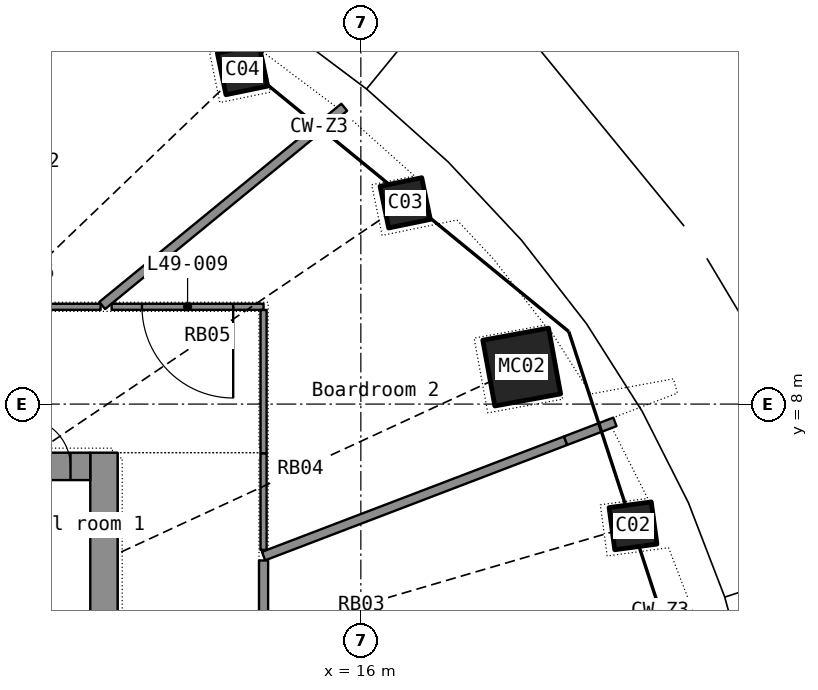
"""IFC4 building model, lengths in metres.
Left out: names, types, materials, properties, quantities, classifications, styles, units other than length and angle.
Written with IfcOpenShell. Run it as: python <this file> out.ifc"""

import sys

from ifc_helpers import new_model, si_unit, direction, frame, frame_2d, origin, origin_2d, place, context, subcontext, project, spatial, rectangle, hollow_rectangle, extrude, element, fill, save


model = new_model("IFC4")
c1 = context("Model", 3, precision=1e-05, world=origin(), true_north=direction((0.0, 1.0)))
c2 = subcontext(c1, "Body", "Model", "MODEL_VIEW")
j1 = project(units=[si_unit("LENGTHUNIT", "METRE"), si_unit("PLANEANGLEUNIT", "RADIAN")], contexts=[c1])
p1 = place(None, origin())
s1 = spatial("IfcSite", under=j1, at=p1, CompositionType="ELEMENT")
p2 = place(p1, origin())
s2 = spatial("IfcBuilding", under=s1, at=p2, CompositionType="ELEMENT")
p3 = place(p2, frame((0.0, 0.0, 201.5)))
s3 = spatial("IfcBuildingStorey", under=s2, at=p3, CompositionType="ELEMENT", Elevation=201.5)
p4 = place(p3, frame((20.476, 5.998, 0.0), z_axis=(-0.032511791, -0.009694185, 0.999424337), x_axis=(0.410410626, -0.911889695, 0.004505751)))
e1 = element("IfcColumn", 1, at=p4, inside=s3, PredefinedType="COLUMN", context=c2, shape_type="SweptSolid", body=[
    extrude(hollow_rectangle(XDim=0.7, YDim=0.7, WallThickness=0.025, at=origin_2d()), origin(), (0.0, 0.0, 1.0), 3.702),
])
p5 = place(p3, frame((18.646, 8.609, 0.0), z_axis=(-0.029940695, -0.014113015, 0.999452039), x_axis=(0.582481605, -0.812821947, 0.005971808)))
e2 = element("IfcColumn", 2, at=p5, inside=s3, PredefinedType="COLUMN", context=c2, shape_type="SweptSolid", body=[
    extrude(hollow_rectangle(XDim=1.1, YDim=1.1, WallThickness=0.032, at=origin_2d()), origin(), (0.0, 0.0, 1.0), 3.702),
])
p6 = place(p3, frame((16.729, 11.31, 0.0), z_axis=(-0.026512179, -0.018202391, 0.999482755), x_axis=(0.720491942, -0.693433005, 0.006483025)))
e3 = element("IfcColumn", 3, at=p6, inside=s3, PredefinedType="COLUMN", context=c2, shape_type="SweptSolid", body=[
    extrude(hollow_rectangle(XDim=0.7, YDim=0.7, WallThickness=0.025, at=origin_2d()), origin(), (0.0, 0.0, 1.0), 3.702),
])
p7 = place(p3, frame((14.053, 13.502, 0.0), z_axis=(-0.022226156, -0.021698532, 0.999517469), x_axis=(0.828555744, -0.559871471, 0.006270246)))
e4 = element("IfcColumn", 4, at=p7, inside=s3, PredefinedType="COLUMN", context=c2, shape_type="SweptSolid", body=[
    extrude(hollow_rectangle(XDim=0.7, YDim=0.7, WallThickness=0.025, at=origin_2d()), origin(), (0.0, 0.0, 1.0), 3.702),
])
p8 = place(p3, frame((11.775, -7.2, 0.0), z_axis=(0.0, 0.0, 1.0), x_axis=(0.0, 1.0, 0.0)))
e5 = element("IfcWall", 5, at=p8, inside=s3, PredefinedType="SHEAR", context=c2, shape_type="SweptSolid", body=[
    extrude(rectangle(XDim=14.4, YDim=0.45, at=frame_2d((7.2, 0.0))), origin(), (0.0, 0.0, 1.0), 3.3),
])
p9 = place(p8, frame((6.5, 0.0, 0.0)))
e6 = element("IfcOpeningElement", 6, at=p9, cuts=e5, PredefinedType="OPENING", context=c2, shape_type="SweptSolid", body=[
    extrude(rectangle(XDim=1.4, YDim=2.2, at=frame_2d((0.7, 1.1))), frame((0.0, 0.235, 0.0), z_axis=(0.0, -1.0, 0.0), x_axis=(1.0, 0.0, 0.0)), (0.0, 0.0, 1.0), 0.47),
])
p10 = place(p3, frame((-11.55, 6.975, 0.0), z_axis=(0.0, 0.0, 1.0), x_axis=(1.0, 0.0, 0.0)))
e7 = element("IfcWall", 7, at=p10, inside=s3, PredefinedType="SHEAR", context=c2, shape_type="SweptSolid", body=[
    extrude(rectangle(XDim=23.1, YDim=0.45, at=frame_2d((11.55, 0.0))), origin(), (0.0, 0.0, 1.0), 3.3),
])
p11 = place(p10, frame((2.0, 0.0, 0.0)))
e8 = element("IfcOpeningElement", 8, at=p11, cuts=e7, PredefinedType="OPENING", context=c2, shape_type="SweptSolid", body=[
    extrude(rectangle(XDim=1.1, YDim=2.2, at=frame_2d((0.55, 1.1))), frame((0.0, 0.235, 0.0), z_axis=(0.0, -1.0, 0.0), x_axis=(1.0, 0.0, 0.0)), (0.0, 0.0, 1.0), 0.47),
])
p12 = place(p10, frame((6.0, 0.0, 0.0)))
e9 = element("IfcOpeningElement", 9, at=p12, cuts=e7, PredefinedType="OPENING", context=c2, shape_type="SweptSolid", body=[
    extrude(rectangle(XDim=1.1, YDim=2.2, at=frame_2d((0.55, 1.1))), frame((0.0, 0.235, 0.0), z_axis=(0.0, -1.0, 0.0), x_axis=(1.0, 0.0, 0.0)), (0.0, 0.0, 1.0), 0.47),
])
p13 = place(p10, frame((8.0, 0.0, 0.0)))
e10 = element("IfcOpeningElement", 10, at=p13, cuts=e7, PredefinedType="OPENING", context=c2, shape_type="SweptSolid", body=[
    extrude(rectangle(XDim=1.1, YDim=2.2, at=frame_2d((0.55, 1.1))), frame((0.0, 0.235, 0.0), z_axis=(0.0, -1.0, 0.0), x_axis=(1.0, 0.0, 0.0)), (0.0, 0.0, 1.0), 0.47),
])
p14 = place(p10, frame((10.0, 0.0, 0.0)))
e11 = element("IfcOpeningElement", 11, at=p14, cuts=e7, PredefinedType="OPENING", context=c2, shape_type="SweptSolid", body=[
    extrude(rectangle(XDim=1.1, YDim=2.2, at=frame_2d((0.55, 1.1))), frame((0.0, 0.235, 0.0), z_axis=(0.0, -1.0, 0.0), x_axis=(1.0, 0.0, 0.0)), (0.0, 0.0, 1.0), 0.47),
])
p15 = place(p10, frame((12.0, 0.0, 0.0)))
e12 = element("IfcOpeningElement", 12, at=p15, cuts=e7, PredefinedType="OPENING", context=c2, shape_type="SweptSolid", body=[
    extrude(rectangle(XDim=1.1, YDim=2.2, at=frame_2d((0.55, 1.1))), frame((0.0, 0.235, 0.0), z_axis=(0.0, -1.0, 0.0), x_axis=(1.0, 0.0, 0.0)), (0.0, 0.0, 1.0), 0.47),
])
p16 = place(p10, frame((14.0, 0.0, 0.0)))
e13 = element("IfcOpeningElement", 13, at=p16, cuts=e7, PredefinedType="OPENING", context=c2, shape_type="SweptSolid", body=[
    extrude(rectangle(XDim=1.1, YDim=2.2, at=frame_2d((0.55, 1.1))), frame((0.0, 0.235, 0.0), z_axis=(0.0, -1.0, 0.0), x_axis=(1.0, 0.0, 0.0)), (0.0, 0.0, 1.0), 0.47),
])
p17 = place(p10, frame((16.0, 0.0, 0.0)))
e14 = element("IfcOpeningElement", 14, at=p17, cuts=e7, PredefinedType="OPENING", context=c2, shape_type="SweptSolid", body=[
    extrude(rectangle(XDim=1.1, YDim=2.2, at=frame_2d((0.55, 1.1))), frame((0.0, 0.235, 0.0), z_axis=(0.0, -1.0, 0.0), x_axis=(1.0, 0.0, 0.0)), (0.0, 0.0, 1.0), 0.47),
])
p18 = place(p10, frame((18.0, 0.0, 0.0)))
e15 = element("IfcOpeningElement", 15, at=p18, cuts=e7, PredefinedType="OPENING", context=c2, shape_type="SweptSolid", body=[
    extrude(rectangle(XDim=1.1, YDim=2.2, at=frame_2d((0.55, 1.1))), frame((0.0, 0.235, 0.0), z_axis=(0.0, -1.0, 0.0), x_axis=(1.0, 0.0, 0.0)), (0.0, 0.0, 1.0), 0.47),
])
p19 = place(p10, frame((20.0, 0.0, 0.0)))
e16 = element("IfcOpeningElement", 16, at=p19, cuts=e7, PredefinedType="OPENING", context=c2, shape_type="SweptSolid", body=[
    extrude(rectangle(XDim=1.1, YDim=2.2, at=frame_2d((0.55, 1.1))), frame((0.0, 0.235, 0.0), z_axis=(0.0, -1.0, 0.0), x_axis=(1.0, 0.0, 0.0)), (0.0, 0.0, 1.0), 0.47),
])
p20 = place(p10, frame((4.1, 0.0, 0.0)))
e17 = element("IfcOpeningElement", 17, at=p20, cuts=e7, PredefinedType="OPENING", context=c2, shape_type="SweptSolid", body=[
    extrude(rectangle(XDim=0.9, YDim=2.1, at=frame_2d((0.45, 1.05))), frame((0.0, 0.235, 0.0), z_axis=(0.0, -1.0, 0.0), x_axis=(1.0, 0.0, 0.0)), (0.0, 0.0, 1.0), 0.47),
])
p21 = place(p10, frame((0.325, 0.0, 0.0)))
e18 = element("IfcOpeningElement", 18, at=p21, cuts=e7, PredefinedType="OPENING", context=c2, shape_type="SweptSolid", body=[
    extrude(rectangle(XDim=0.8, YDim=2.05, at=frame_2d((0.4, 1.025))), frame((0.0, 0.235, 0.0), z_axis=(0.0, -1.0, 0.0), x_axis=(1.0, 0.0, 0.0)), (0.0, 0.0, 1.0), 0.47),
])
p22 = place(p10, frame((21.975, 0.0, 0.0)))
e19 = element("IfcOpeningElement", 19, at=p22, cuts=e7, PredefinedType="OPENING", context=c2, shape_type="SweptSolid", body=[
    extrude(rectangle(XDim=0.8, YDim=2.05, at=frame_2d((0.4, 1.025))), frame((0.0, 0.235, 0.0), z_axis=(0.0, -1.0, 0.0), x_axis=(1.0, 0.0, 0.0)), (0.0, 0.0, 1.0), 0.47),
])
p23 = place(p3, frame((11.72, 9.6, 0.0), z_axis=(0.0, 0.0, 1.0), x_axis=(-1.0, 0.0, 0.0)))
e20 = element("IfcWall", 20, at=p23, inside=s3, PredefinedType="PARTITIONING", context=c2, shape_type="SweptSolid", body=[
    extrude(rectangle(XDim=6.138, YDim=0.1, at=frame_2d((3.069, 0.0))), origin(), (0.0, 0.0, 1.0), 2.4),
])
p24 = place(p23, frame((2.319, 0.0, 0.0)))
e21 = element("IfcOpeningElement", 21, at=p24, cuts=e20, PredefinedType="OPENING", context=c2, shape_type="SweptSolid", body=[
    extrude(rectangle(XDim=1.5, YDim=2.4, at=frame_2d((0.75, 1.2))), frame((0.0, 0.06, 0.0), z_axis=(0.0, -1.0, 0.0), x_axis=(1.0, 0.0, 0.0)), (0.0, 0.0, 1.0), 0.12),
])
p25 = place(p3, frame((19.367, 7.397, 0.0), z_axis=(0.0, 0.0, 1.0), x_axis=(-0.934183326, -0.356793376, 0.0)))
e22 = element("IfcWall", 22, at=p25, inside=s3, PredefinedType="PARTITIONING", context=c2, shape_type="SweptSolid", body=[
    extrude(rectangle(XDim=5.317, YDim=0.15, at=frame_2d((2.658, 0.0))), origin(), (0.0, 0.0, 1.0), 2.4),
])
p26 = place(p3, frame((15.727, 12.882, 0.0), z_axis=(0.0, 0.0, 1.0), x_axis=(-0.773595696, -0.633679492, 0.0)))
e23 = element("IfcWall", 23, at=p26, inside=s3, PredefinedType="PARTITIONING", context=c2, shape_type="SweptSolid", body=[
    extrude(rectangle(XDim=5.146, YDim=0.15, at=frame_2d((2.573, 0.0))), origin(), (0.0, 0.0, 1.0), 2.4),
])
p27 = place(p3, frame((14.4, 1.577, 0.0), z_axis=(0.0, 0.0, 1.0), x_axis=(0.0, 1.0, 0.0)))
e24 = element("IfcWall", 24, at=p27, inside=s3, PredefinedType="PARTITIONING", context=c2, shape_type="SweptSolid", body=[
    extrude(rectangle(XDim=3.851, YDim=0.15, at=frame_2d((1.926, 0.0))), origin(), (0.0, 0.0, 1.0), 2.4),
])
p28 = place(p3, frame((14.4, 9.6, 0.0), z_axis=(0.0, 0.0, 1.0), x_axis=(-1.0, 0.0, 0.0)))
e25 = element("IfcWall", 25, at=p28, inside=s3, PredefinedType="PARTITIONING", context=c2, shape_type="SweptSolid", body=[
    extrude(rectangle(XDim=2.499, YDim=0.1, at=frame_2d((1.249, 0.0))), origin(), (0.0, 0.0, 1.0), 2.4),
])
p29 = place(p28, frame((0.499, 0.0, 0.0)))
e26 = element("IfcOpeningElement", 26, at=p29, cuts=e25, PredefinedType="OPENING", context=c2, shape_type="SweptSolid", body=[
    extrude(rectangle(XDim=1.5, YDim=2.4, at=frame_2d((0.75, 1.2))), frame((0.0, 0.06, 0.0), z_axis=(0.0, -1.0, 0.0), x_axis=(1.0, 0.0, 0.0)), (0.0, 0.0, 1.0), 0.12),
])
p30 = place(p3, frame((14.4, 7.188, 0.0), z_axis=(0.0, 0.0, 1.0), x_axis=(0.0, 1.0, 0.0)))
e27 = element("IfcWall", 27, at=p30, inside=s3, PredefinedType="PARTITIONING", context=c2, shape_type="SweptSolid", body=[
    extrude(rectangle(XDim=2.36, YDim=0.1, at=frame_2d((1.18, 0.0))), origin(), (0.0, 0.0, 1.0), 2.4),
])
p31 = place(p3, frame((14.4, 5.602, 0.0), z_axis=(0.0, 0.0, 1.0), x_axis=(0.0, 1.0, 0.0)))
e28 = element("IfcWall", 28, at=p31, inside=s3, PredefinedType="PARTITIONING", context=c2, shape_type="SweptSolid", body=[
    extrude(rectangle(XDim=1.585, YDim=0.1, at=frame_2d((0.793, 0.0))), origin(), (0.0, 0.0, 1.0), 2.4),
])
p32 = place(p3, frame((20.178, 7.707, 0.0), z_axis=(0.0, 0.0, 1.0), x_axis=(-0.934184285, -0.356790865, 0.0)))
e29 = element("IfcWall", 29, at=p32, inside=s3, PredefinedType="PARTITIONING", context=c2, shape_type="SweptSolid", body=[
    extrude(rectangle(XDim=0.868, YDim=0.15, at=frame_2d((0.434, 0.0))), origin(), (0.0, 0.0, 1.0), 2.4),
])
p33 = place(p22, origin())
e30 = element("IfcDoor", 30, at=p33, inside=s3, OperationType="SINGLE_SWING_LEFT", PredefinedType="DOOR", context=c2, shape_type="SweptSolid", body=[
    extrude(rectangle(XDim=0.8, YDim=2.05, at=frame_2d((0.4, 1.025))), frame((0.0, 0.025, 0.0), z_axis=(0.0, -1.0, 0.0), x_axis=(1.0, 0.0, 0.0)), (0.0, 0.0, 1.0), 0.05),
])
fill(e19, e30)
p34 = place(p29, origin())
e31 = element("IfcDoor", 31, at=p34, inside=s3, OperationType="DOUBLE_DOOR_SINGLE_SWING", PredefinedType="DOOR", context=c2, shape_type="SweptSolid", body=[
    extrude(rectangle(XDim=1.5, YDim=2.4, at=frame_2d((0.75, 1.2))), frame((0.0, 0.025, 0.0), z_axis=(0.0, -1.0, 0.0), x_axis=(1.0, 0.0, 0.0)), (0.0, 0.0, 1.0), 0.05),
])
fill(e26, e31)
save(model, sys.argv[1])
